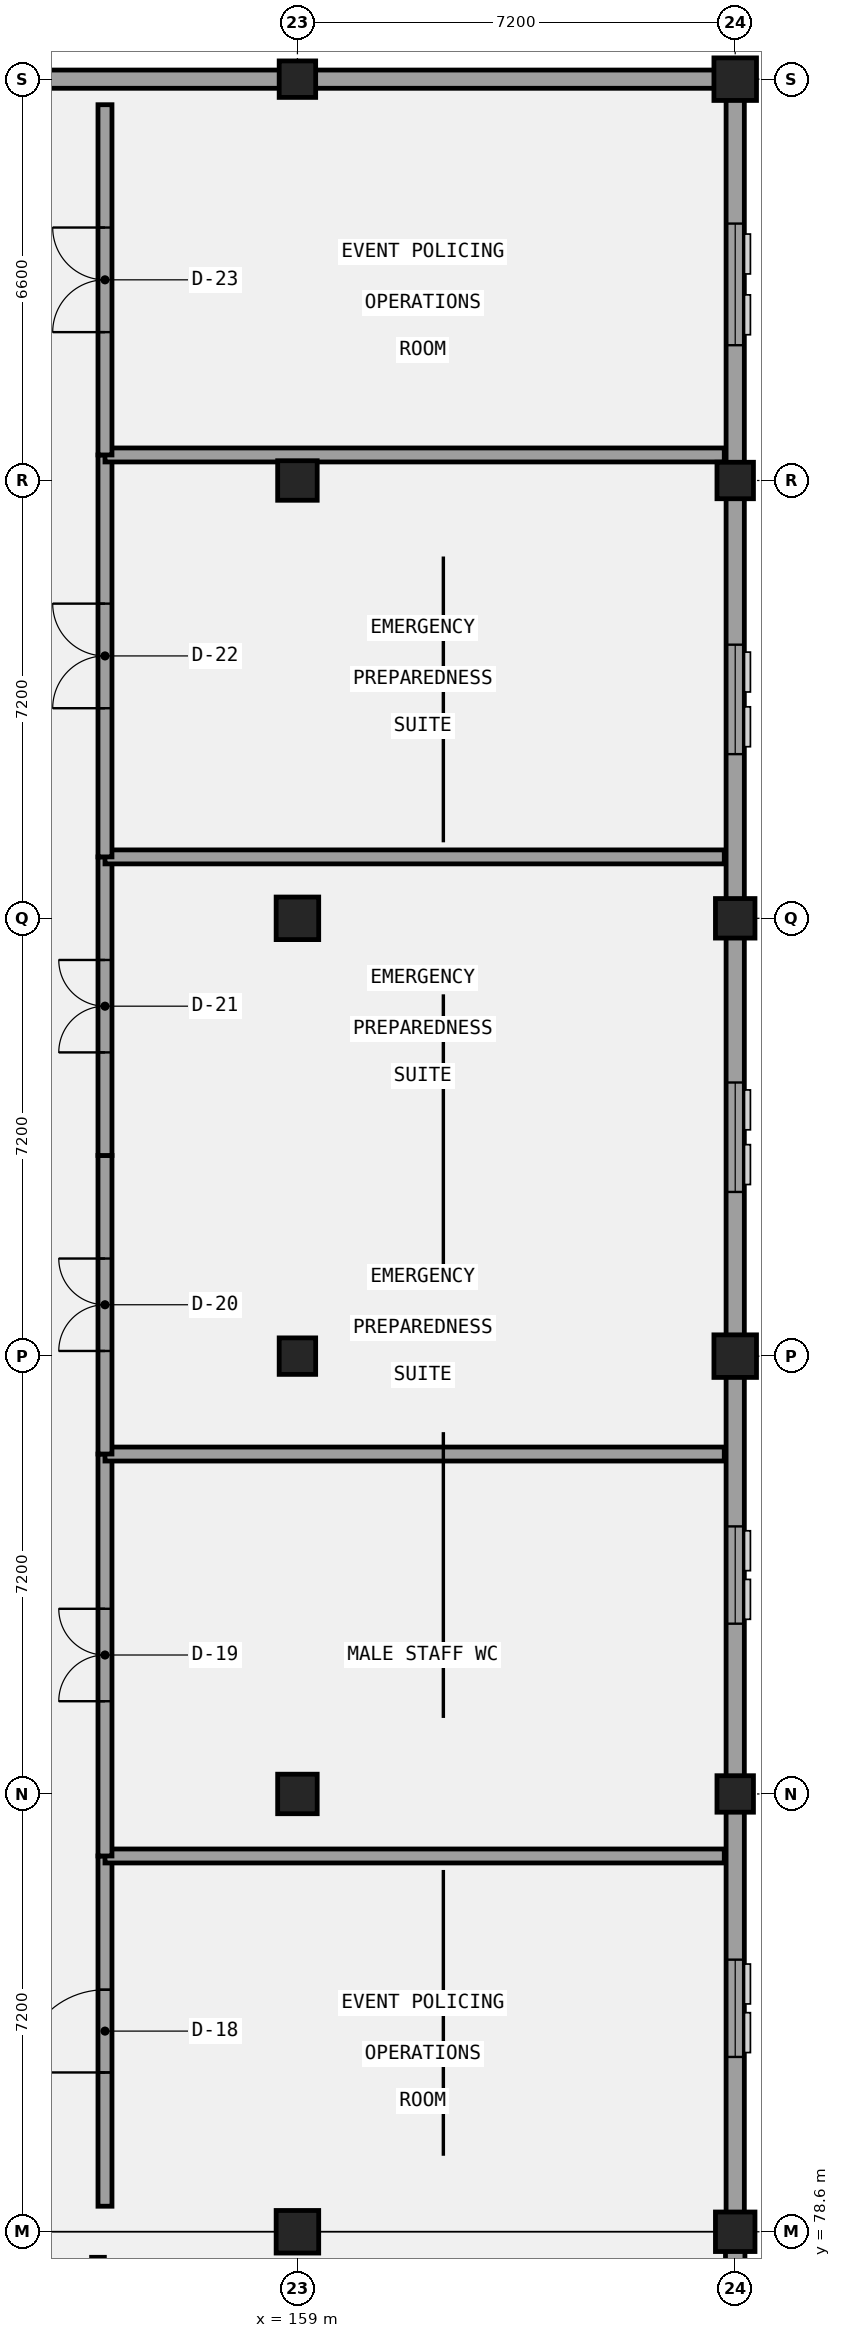
"""IFC4 building model, lengths in metres.
Left out: names, types, materials, properties, quantities, classifications, styles, units other than length and angle.
Written with IfcOpenShell. Run it as: python <this file> out.ifc"""

import sys

from ifc_helpers import new_model, si_unit, direction, frame, frame_2d, origin, origin_2d, place, context, subcontext, project, spatial, rectangle, extrude, element, fill, save


model = new_model("IFC4")
c1 = context("Model", 3, precision=1e-05, world=origin(), true_north=direction((0.0, 1.0)))
c2 = subcontext(c1, "Body", "Model", "MODEL_VIEW")
j1 = project(units=[si_unit("LENGTHUNIT", "METRE"), si_unit("PLANEANGLEUNIT", "RADIAN")], contexts=[c1])
p1 = place(None, origin())
s1 = spatial("IfcSite", under=j1, at=p1, CompositionType="ELEMENT")
p2 = place(p1, origin())
s2 = spatial("IfcBuilding", under=s1, at=p2, CompositionType="ELEMENT")
p3 = place(p2, frame((0.0, 0.0, 9.6)))
s3 = spatial("IfcBuildingStorey", under=s2, at=p3, CompositionType="ELEMENT", Elevation=9.6)
p4 = place(p3, frame((159.0, 78.6, 0.0), z_axis=(0.0, 0.0, 1.0), x_axis=(1.0, 0.0, 0.0)))
e1 = element("IfcColumn", 1, at=p4, inside=s3, PredefinedType="COLUMN", context=c2, shape_type="SweptSolid", body=[
    extrude(rectangle(XDim=0.7, YDim=0.7, at=origin_2d()), origin(), (0.0, 0.0, 1.0), 4.2),
])
p5 = place(p3, frame((159.0, 85.8, 0.0), z_axis=(0.0, 0.0, 1.0), x_axis=(1.0, 0.0, 0.0)))
e2 = element("IfcColumn", 2, at=p5, inside=s3, PredefinedType="COLUMN", context=c2, shape_type="SweptSolid", body=[
    extrude(rectangle(XDim=0.65, YDim=0.65, at=origin_2d()), origin(), (0.0, 0.0, 1.0), 4.2),
])
p6 = place(p3, frame((159.0, 93.0, 0.0), z_axis=(0.0, 0.0, 1.0), x_axis=(1.0, 0.0, 0.0)))
e3 = element("IfcColumn", 3, at=p6, inside=s3, PredefinedType="COLUMN", context=c2, shape_type="SweptSolid", body=[
    extrude(rectangle(XDim=0.6, YDim=0.6, at=origin_2d()), origin(), (0.0, 0.0, 1.0), 4.2),
])
p7 = place(p3, frame((159.0, 100.2, 0.0), z_axis=(0.0, 0.0, 1.0), x_axis=(1.0, 0.0, 0.0)))
e4 = element("IfcColumn", 4, at=p7, inside=s3, PredefinedType="COLUMN", context=c2, shape_type="SweptSolid", body=[
    extrude(rectangle(XDim=0.7, YDim=0.7, at=origin_2d()), origin(), (0.0, 0.0, 1.0), 4.2),
])
p8 = place(p3, frame((159.0, 107.4, 0.0), z_axis=(0.0, 0.0, 1.0), x_axis=(1.0, 0.0, 0.0)))
e5 = element("IfcColumn", 5, at=p8, inside=s3, PredefinedType="COLUMN", context=c2, shape_type="SweptSolid", body=[
    extrude(rectangle(XDim=0.65, YDim=0.65, at=origin_2d()), origin(), (0.0, 0.0, 1.0), 4.2),
])
p9 = place(p3, frame((159.0, 114.0, 0.0), z_axis=(0.0, 0.0, 1.0), x_axis=(1.0, 0.0, 0.0)))
e6 = element("IfcColumn", 6, at=p9, inside=s3, PredefinedType="COLUMN", context=c2, shape_type="SweptSolid", body=[
    extrude(rectangle(XDim=0.6, YDim=0.6, at=origin_2d()), origin(), (0.0, 0.0, 1.0), 4.2),
])
p10 = place(p3, frame((166.2, 78.6, 0.0), z_axis=(0.0, 0.0, 1.0), x_axis=(1.0, 0.0, 0.0)))
e7 = element("IfcColumn", 7, at=p10, inside=s3, PredefinedType="COLUMN", context=c2, shape_type="SweptSolid", body=[
    extrude(rectangle(XDim=0.65, YDim=0.65, at=origin_2d()), origin(), (0.0, 0.0, 1.0), 4.2),
])
p11 = place(p3, frame((166.2, 85.8, 0.0), z_axis=(0.0, 0.0, 1.0), x_axis=(1.0, 0.0, 0.0)))
e8 = element("IfcColumn", 8, at=p11, inside=s3, PredefinedType="COLUMN", context=c2, shape_type="SweptSolid", body=[
    extrude(rectangle(XDim=0.6, YDim=0.6, at=origin_2d()), origin(), (0.0, 0.0, 1.0), 4.2),
])
p12 = place(p3, frame((166.2, 93.0, 0.0), z_axis=(0.0, 0.0, 1.0), x_axis=(1.0, 0.0, 0.0)))
e9 = element("IfcColumn", 9, at=p12, inside=s3, PredefinedType="COLUMN", context=c2, shape_type="SweptSolid", body=[
    extrude(rectangle(XDim=0.7, YDim=0.7, at=origin_2d()), origin(), (0.0, 0.0, 1.0), 4.2),
])
p13 = place(p3, frame((166.2, 100.2, 0.0), z_axis=(0.0, 0.0, 1.0), x_axis=(1.0, 0.0, 0.0)))
e10 = element("IfcColumn", 10, at=p13, inside=s3, PredefinedType="COLUMN", context=c2, shape_type="SweptSolid", body=[
    extrude(rectangle(XDim=0.65, YDim=0.65, at=origin_2d()), origin(), (0.0, 0.0, 1.0), 4.2),
])
p14 = place(p3, frame((166.2, 107.4, 0.0), z_axis=(0.0, 0.0, 1.0), x_axis=(1.0, 0.0, 0.0)))
e11 = element("IfcColumn", 11, at=p14, inside=s3, PredefinedType="COLUMN", context=c2, shape_type="SweptSolid", body=[
    extrude(rectangle(XDim=0.6, YDim=0.6, at=origin_2d()), origin(), (0.0, 0.0, 1.0), 4.2),
])
p15 = place(p3, frame((166.2, 114.0, 0.0), z_axis=(0.0, 0.0, 1.0), x_axis=(1.0, 0.0, 0.0)))
e12 = element("IfcColumn", 12, at=p15, inside=s3, PredefinedType="COLUMN", context=c2, shape_type="SweptSolid", body=[
    extrude(rectangle(XDim=0.7, YDim=0.7, at=origin_2d()), origin(), (0.0, 0.0, 1.0), 4.2),
])
p16 = place(p3, frame((166.2, 49.99, 0.0), z_axis=(0.0, 0.0, 1.0), x_axis=(0.0, 1.0, 0.0)))
e13 = element("IfcWall", 13, at=p16, inside=s3, PredefinedType="SOLIDWALL", context=c2, shape_type="SweptSolid", body=[
    extrude(rectangle(XDim=28.45, YDim=0.32, at=frame_2d((14.225, 0.0))), origin(), (0.0, 0.0, 1.0), 3.19),
])
p17 = place(p16, frame((2.605, 0.0, 1.0)))
e14 = element("IfcOpeningElement", 14, at=p17, cuts=e13, PredefinedType="OPENING", context=c2, shape_type="SweptSolid", body=[
    extrude(rectangle(XDim=1.8, YDim=1.9, at=frame_2d((0.9, 0.95))), frame((0.0, 0.17, 0.0), z_axis=(0.0, -1.0, 0.0), x_axis=(1.0, 0.0, 0.0)), (0.0, 0.0, 1.0), 0.34),
])
p18 = place(p16, frame((9.71, 0.0, 1.0)))
e15 = element("IfcOpeningElement", 15, at=p18, cuts=e13, PredefinedType="OPENING", context=c2, shape_type="SweptSolid", body=[
    extrude(rectangle(XDim=1.8, YDim=1.9, at=frame_2d((0.9, 0.95))), frame((0.0, 0.17, 0.0), z_axis=(0.0, -1.0, 0.0), x_axis=(1.0, 0.0, 0.0)), (0.0, 0.0, 1.0), 0.34),
])
p19 = place(p16, frame((16.91, 0.0, 1.0)))
e16 = element("IfcOpeningElement", 16, at=p19, cuts=e13, PredefinedType="OPENING", context=c2, shape_type="SweptSolid", body=[
    extrude(rectangle(XDim=1.8, YDim=1.9, at=frame_2d((0.9, 0.95))), frame((0.0, 0.17, 0.0), z_axis=(0.0, -1.0, 0.0), x_axis=(1.0, 0.0, 0.0)), (0.0, 0.0, 1.0), 0.34),
])
p20 = place(p16, frame((24.03, 0.0, 1.0)))
e17 = element("IfcOpeningElement", 17, at=p20, cuts=e13, PredefinedType="OPENING", context=c2, shape_type="SweptSolid", body=[
    extrude(rectangle(XDim=1.8, YDim=1.9, at=frame_2d((0.9, 0.95))), frame((0.0, 0.17, 0.0), z_axis=(0.0, -1.0, 0.0), x_axis=(1.0, 0.0, 0.0)), (0.0, 0.0, 1.0), 0.34),
])
p21 = place(p3, frame((166.2, 78.75, 0.0), z_axis=(0.0, 0.0, 1.0), x_axis=(0.0, 1.0, 0.0)))
e18 = element("IfcWall", 18, at=p21, inside=s3, PredefinedType="SOLIDWALL", context=c2, shape_type="SweptSolid", body=[
    extrude(rectangle(XDim=35.1, YDim=0.3, at=frame_2d((17.55, 0.0))), origin(), (0.0, 0.0, 1.0), 2.94),
])
p22 = place(p21, frame((2.725, 0.0, 0.95)))
e19 = element("IfcOpeningElement", 19, at=p22, cuts=e18, PredefinedType="OPENING", context=c2, shape_type="SweptSolid", body=[
    extrude(rectangle(XDim=1.6, YDim=1.4, at=frame_2d((0.8, 0.7))), frame((0.0, 0.16, 0.0), z_axis=(0.0, -1.0, 0.0), x_axis=(1.0, 0.0, 0.0)), (0.0, 0.0, 1.0), 0.32),
])
p23 = place(p21, frame((9.85, 0.0, 0.95)))
e20 = element("IfcOpeningElement", 20, at=p23, cuts=e18, PredefinedType="OPENING", context=c2, shape_type="SweptSolid", body=[
    extrude(rectangle(XDim=1.6, YDim=1.65, at=frame_2d((0.8, 0.825))), frame((0.0, 0.16, 0.0), z_axis=(0.0, -1.0, 0.0), x_axis=(1.0, 0.0, 0.0)), (0.0, 0.0, 1.0), 0.32),
])
p24 = place(p21, frame((16.95, 0.0, 0.95)))
e21 = element("IfcOpeningElement", 21, at=p24, cuts=e18, PredefinedType="OPENING", context=c2, shape_type="SweptSolid", body=[
    extrude(rectangle(XDim=1.8, YDim=1.4, at=frame_2d((0.9, 0.7))), frame((0.0, 0.16, 0.0), z_axis=(0.0, -1.0, 0.0), x_axis=(1.0, 0.0, 0.0)), (0.0, 0.0, 1.0), 0.32),
])
p25 = place(p21, frame((24.15, 0.0, 0.95)))
e22 = element("IfcOpeningElement", 22, at=p25, cuts=e18, PredefinedType="OPENING", context=c2, shape_type="SweptSolid", body=[
    extrude(rectangle(XDim=1.8, YDim=1.65, at=frame_2d((0.9, 0.825))), frame((0.0, 0.16, 0.0), z_axis=(0.0, -1.0, 0.0), x_axis=(1.0, 0.0, 0.0)), (0.0, 0.0, 1.0), 0.32),
])
p26 = place(p21, frame((30.875, 0.0, 0.95)))
e23 = element("IfcOpeningElement", 23, at=p26, cuts=e18, PredefinedType="OPENING", context=c2, shape_type="SweptSolid", body=[
    extrude(rectangle(XDim=2.0, YDim=1.4, at=frame_2d((1.0, 0.7))), frame((0.0, 0.16, 0.0), z_axis=(0.0, -1.0, 0.0), x_axis=(1.0, 0.0, 0.0)), (0.0, 0.0, 1.0), 0.32),
])
p27 = place(p3, frame((166.35, 114.0, 0.0), z_axis=(0.0, 0.0, 1.0), x_axis=(-1.0, 0.0, 0.0)))
e24 = element("IfcWall", 24, at=p27, inside=s3, PredefinedType="SOLIDWALL", context=c2, shape_type="SweptSolid", body=[
    extrude(rectangle(XDim=21.9, YDim=0.3, at=frame_2d((10.95, 0.0))), origin(), (0.0, 0.0, 1.0), 3.19),
])
p28 = place(p27, frame((17.5, 0.0, 0.95)))
e25 = element("IfcOpeningElement", 25, at=p28, cuts=e24, PredefinedType="OPENING", context=c2, shape_type="SweptSolid", body=[
    extrude(rectangle(XDim=1.3, YDim=1.65, at=frame_2d((0.65, 0.825))), frame((0.0, 0.16, 0.0), z_axis=(0.0, -1.0, 0.0), x_axis=(1.0, 0.0, 0.0)), (0.0, 0.0, 1.0), 0.32),
])
p29 = place(p3, frame((155.835, 79.02, 0.0), z_axis=(0.0, 0.0, 1.0), x_axis=(0.0, 1.0, 0.0)))
e26 = element("IfcWall", 26, at=p29, inside=s3, PredefinedType="PARTITIONING", context=c2, shape_type="SweptSolid", body=[
    extrude(rectangle(XDim=5.76, YDim=0.23, at=frame_2d((2.88, 0.0))), origin(), (0.0, 0.0, 1.0), 3.94),
])
p30 = place(p29, frame((2.2, 0.0, 0.0)))
e27 = element("IfcOpeningElement", 27, at=p30, cuts=e26, PredefinedType="OPENING", context=c2, shape_type="SweptSolid", body=[
    extrude(rectangle(XDim=1.36, YDim=2.35, at=frame_2d((0.68, 1.175))), frame((0.0, 0.125, 0.0), z_axis=(0.0, -1.0, 0.0), x_axis=(1.0, 0.0, 0.0)), (0.0, 0.0, 1.0), 0.25),
])
p31 = place(p3, frame((155.835, 84.78, 0.0), z_axis=(0.0, 0.0, 1.0), x_axis=(1.0, 0.0, 0.0)))
e28 = element("IfcWall", 28, at=p31, inside=s3, PredefinedType="PARTITIONING", context=c2, shape_type="SweptSolid", body=[
    extrude(rectangle(XDim=10.185, YDim=0.23, at=frame_2d((5.093, 0.0))), origin(), (0.0, 0.0, 1.0), 3.94),
])
p32 = place(p3, frame((155.835, 84.78, 0.0), z_axis=(0.0, 0.0, 1.0), x_axis=(0.0, 1.0, 0.0)))
e29 = element("IfcWall", 29, at=p32, inside=s3, PredefinedType="PARTITIONING", context=c2, shape_type="SweptSolid", body=[
    extrude(rectangle(XDim=6.61, YDim=0.23, at=frame_2d((3.305, 0.0))), origin(), (0.0, 0.0, 1.0), 3.94),
])
p33 = place(p32, frame((2.545, 0.0, 0.0)))
e30 = element("IfcOpeningElement", 30, at=p33, cuts=e29, PredefinedType="OPENING", context=c2, shape_type="SweptSolid", body=[
    extrude(rectangle(XDim=1.52, YDim=2.1, at=frame_2d((0.76, 1.05))), frame((0.0, 0.125, 0.0), z_axis=(0.0, -1.0, 0.0), x_axis=(1.0, 0.0, 0.0)), (0.0, 0.0, 1.0), 0.25),
])
p34 = place(p3, frame((155.835, 91.39, 0.0), z_axis=(0.0, 0.0, 1.0), x_axis=(1.0, 0.0, 0.0)))
e31 = element("IfcWall", 31, at=p34, inside=s3, PredefinedType="PARTITIONING", context=c2, shape_type="SweptSolid", body=[
    extrude(rectangle(XDim=10.185, YDim=0.23, at=frame_2d((5.093, 0.0))), origin(), (0.0, 0.0, 1.0), 3.39),
])
p35 = place(p3, frame((155.835, 91.39, 0.0), z_axis=(0.0, 0.0, 1.0), x_axis=(0.0, 1.0, 0.0)))
e32 = element("IfcWall", 32, at=p35, inside=s3, PredefinedType="PARTITIONING", context=c2, shape_type="SweptSolid", body=[
    extrude(rectangle(XDim=4.91, YDim=0.23, at=frame_2d((2.455, 0.0))), origin(), (0.0, 0.0, 1.0), 3.94),
])
p36 = place(p35, frame((1.695, 0.0, 0.0)))
e33 = element("IfcOpeningElement", 33, at=p36, cuts=e32, PredefinedType="OPENING", context=c2, shape_type="SweptSolid", body=[
    extrude(rectangle(XDim=1.52, YDim=2.22, at=frame_2d((0.76, 1.11))), frame((0.0, 0.125, 0.0), z_axis=(0.0, -1.0, 0.0), x_axis=(1.0, 0.0, 0.0)), (0.0, 0.0, 1.0), 0.25),
])
p37 = place(p3, frame((155.835, 96.3, 0.0), z_axis=(0.0, 0.0, 1.0), x_axis=(0.0, 1.0, 0.0)))
e34 = element("IfcWall", 34, at=p37, inside=s3, PredefinedType="PARTITIONING", context=c2, shape_type="SweptSolid", body=[
    extrude(rectangle(XDim=4.91, YDim=0.23, at=frame_2d((2.455, 0.0))), origin(), (0.0, 0.0, 1.0), 3.94),
])
p38 = place(p37, frame((1.695, 0.0, 0.0)))
e35 = element("IfcOpeningElement", 35, at=p38, cuts=e34, PredefinedType="OPENING", context=c2, shape_type="SweptSolid", body=[
    extrude(rectangle(XDim=1.52, YDim=2.35, at=frame_2d((0.76, 1.175))), frame((0.0, 0.125, 0.0), z_axis=(0.0, -1.0, 0.0), x_axis=(1.0, 0.0, 0.0)), (0.0, 0.0, 1.0), 0.25),
])
p39 = place(p3, frame((155.835, 101.21, 0.0), z_axis=(0.0, 0.0, 1.0), x_axis=(1.0, 0.0, 0.0)))
e36 = element("IfcWall", 36, at=p39, inside=s3, PredefinedType="PARTITIONING", context=c2, shape_type="SweptSolid", body=[
    extrude(rectangle(XDim=10.185, YDim=0.23, at=frame_2d((5.093, 0.0))), origin(), (0.0, 0.0, 1.0), 3.94),
])
p40 = place(p3, frame((155.835, 101.21, 0.0), z_axis=(0.0, 0.0, 1.0), x_axis=(0.0, 1.0, 0.0)))
e37 = element("IfcWall", 37, at=p40, inside=s3, PredefinedType="PARTITIONING", context=c2, shape_type="SweptSolid", body=[
    extrude(rectangle(XDim=6.61, YDim=0.23, at=frame_2d((3.305, 0.0))), origin(), (0.0, 0.0, 1.0), 3.94),
])
p41 = place(p40, frame((2.445, 0.0, 0.0)))
e38 = element("IfcOpeningElement", 38, at=p41, cuts=e37, PredefinedType="OPENING", context=c2, shape_type="SweptSolid", body=[
    extrude(rectangle(XDim=1.72, YDim=2.1, at=frame_2d((0.86, 1.05))), frame((0.0, 0.125, 0.0), z_axis=(0.0, -1.0, 0.0), x_axis=(1.0, 0.0, 0.0)), (0.0, 0.0, 1.0), 0.25),
])
p42 = place(p3, frame((155.835, 107.82, 0.0), z_axis=(0.0, 0.0, 1.0), x_axis=(1.0, 0.0, 0.0)))
e39 = element("IfcWall", 39, at=p42, inside=s3, PredefinedType="PARTITIONING", context=c2, shape_type="SweptSolid", body=[
    extrude(rectangle(XDim=10.185, YDim=0.23, at=frame_2d((5.093, 0.0))), origin(), (0.0, 0.0, 1.0), 3.94),
])
p43 = place(p3, frame((155.835, 107.82, 0.0), z_axis=(0.0, 0.0, 1.0), x_axis=(0.0, 1.0, 0.0)))
e40 = element("IfcWall", 40, at=p43, inside=s3, PredefinedType="PARTITIONING", context=c2, shape_type="SweptSolid", body=[
    extrude(rectangle(XDim=5.76, YDim=0.23, at=frame_2d((2.88, 0.0))), origin(), (0.0, 0.0, 1.0), 3.94),
])
p44 = place(p43, frame((2.02, 0.0, 0.0)))
e41 = element("IfcOpeningElement", 41, at=p44, cuts=e40, PredefinedType="OPENING", context=c2, shape_type="SweptSolid", body=[
    extrude(rectangle(XDim=1.72, YDim=2.22, at=frame_2d((0.86, 1.11))), frame((0.0, 0.125, 0.0), z_axis=(0.0, -1.0, 0.0), x_axis=(1.0, 0.0, 0.0)), (0.0, 0.0, 1.0), 0.25),
])
p45 = place(p3, frame((155.72, 72.634, 0.0), z_axis=(0.0, 0.0, 1.0), x_axis=(0.0, 1.0, 0.0)))
e42 = element("IfcWall", 42, at=p45, inside=s3, PredefinedType="PARTITIONING", context=c2, shape_type="SweptSolid", body=[
    extrude(rectangle(XDim=5.546, YDim=0.21, at=frame_2d((2.773, 0.0))), origin(), (0.0, 0.0, 1.0), 3.94),
])
p46 = place(p45, frame((2.163, 0.0, 0.0)))
e43 = element("IfcOpeningElement", 43, at=p46, cuts=e42, PredefinedType="OPENING", context=c2, shape_type="SweptSolid", body=[
    extrude(rectangle(XDim=1.22, YDim=2.35, at=frame_2d((0.61, 1.175))), frame((0.0, 0.115, 0.0), z_axis=(0.0, -1.0, 0.0), x_axis=(1.0, 0.0, 0.0)), (0.0, 0.0, 1.0), 0.23),
])
p47 = place(p22, origin())
e44 = element("IfcWindow", 44, at=p47, inside=s3, PartitioningType="SINGLE_PANEL", PredefinedType="WINDOW", context=c2, shape_type="SweptSolid", body=[
    extrude(rectangle(XDim=1.6, YDim=1.4, at=frame_2d((0.8, 0.7))), frame((0.0, 0.03, 0.0), z_axis=(0.0, -1.0, 0.0), x_axis=(1.0, 0.0, 0.0)), (0.0, 0.0, 1.0), 0.06),
])
fill(e19, e44)
p48 = place(p23, origin())
e45 = element("IfcWindow", 45, at=p48, inside=s3, PartitioningType="SINGLE_PANEL", PredefinedType="WINDOW", context=c2, shape_type="SweptSolid", body=[
    extrude(rectangle(XDim=1.6, YDim=1.65, at=frame_2d((0.8, 0.825))), frame((0.0, 0.03, 0.0), z_axis=(0.0, -1.0, 0.0), x_axis=(1.0, 0.0, 0.0)), (0.0, 0.0, 1.0), 0.06),
])
fill(e20, e45)
p49 = place(p24, origin())
e46 = element("IfcWindow", 46, at=p49, inside=s3, PartitioningType="SINGLE_PANEL", PredefinedType="WINDOW", context=c2, shape_type="SweptSolid", body=[
    extrude(rectangle(XDim=1.8, YDim=1.4, at=frame_2d((0.9, 0.7))), frame((0.0, 0.03, 0.0), z_axis=(0.0, -1.0, 0.0), x_axis=(1.0, 0.0, 0.0)), (0.0, 0.0, 1.0), 0.06),
])
fill(e21, e46)
p50 = place(p25, origin())
e47 = element("IfcWindow", 47, at=p50, inside=s3, PartitioningType="SINGLE_PANEL", PredefinedType="WINDOW", context=c2, shape_type="SweptSolid", body=[
    extrude(rectangle(XDim=1.8, YDim=1.65, at=frame_2d((0.9, 0.825))), frame((0.0, 0.03, 0.0), z_axis=(0.0, -1.0, 0.0), x_axis=(1.0, 0.0, 0.0)), (0.0, 0.0, 1.0), 0.06),
])
fill(e22, e47)
p51 = place(p26, origin())
e48 = element("IfcWindow", 48, at=p51, inside=s3, PartitioningType="SINGLE_PANEL", PredefinedType="WINDOW", context=c2, shape_type="SweptSolid", body=[
    extrude(rectangle(XDim=2.0, YDim=1.4, at=frame_2d((1.0, 0.7))), frame((0.0, 0.03, 0.0), z_axis=(0.0, -1.0, 0.0), x_axis=(1.0, 0.0, 0.0)), (0.0, 0.0, 1.0), 0.06),
])
fill(e23, e48)
p52 = place(p30, origin())
e49 = element("IfcDoor", 49, at=p52, inside=s3, OperationType="SINGLE_SWING_LEFT", PredefinedType="DOOR", context=c2, shape_type="SweptSolid", body=[
    extrude(rectangle(XDim=1.36, YDim=2.35, at=frame_2d((0.68, 1.175))), frame((0.0, 0.025, 0.0), z_axis=(0.0, -1.0, 0.0), x_axis=(1.0, 0.0, 0.0)), (0.0, 0.0, 1.0), 0.05),
])
fill(e27, e49)
p53 = place(p33, origin())
e50 = element("IfcDoor", 50, at=p53, inside=s3, OperationType="DOUBLE_DOOR_SINGLE_SWING", PredefinedType="DOOR", context=c2, shape_type="SweptSolid", body=[
    extrude(rectangle(XDim=1.52, YDim=2.1, at=frame_2d((0.76, 1.05))), frame((0.0, 0.025, 0.0), z_axis=(0.0, -1.0, 0.0), x_axis=(1.0, 0.0, 0.0)), (0.0, 0.0, 1.0), 0.05),
])
fill(e30, e50)
p54 = place(p36, origin())
e51 = element("IfcDoor", 51, at=p54, inside=s3, OperationType="DOUBLE_DOOR_SINGLE_SWING", PredefinedType="DOOR", context=c2, shape_type="SweptSolid", body=[
    extrude(rectangle(XDim=1.52, YDim=2.22, at=frame_2d((0.76, 1.11))), frame((0.0, 0.025, 0.0), z_axis=(0.0, -1.0, 0.0), x_axis=(1.0, 0.0, 0.0)), (0.0, 0.0, 1.0), 0.05),
])
fill(e33, e51)
p55 = place(p38, origin())
e52 = element("IfcDoor", 52, at=p55, inside=s3, OperationType="DOUBLE_DOOR_SINGLE_SWING", PredefinedType="DOOR", context=c2, shape_type="SweptSolid", body=[
    extrude(rectangle(XDim=1.52, YDim=2.35, at=frame_2d((0.76, 1.175))), frame((0.0, 0.025, 0.0), z_axis=(0.0, -1.0, 0.0), x_axis=(1.0, 0.0, 0.0)), (0.0, 0.0, 1.0), 0.05),
])
fill(e35, e52)
p56 = place(p41, origin())
e53 = element("IfcDoor", 53, at=p56, inside=s3, OperationType="DOUBLE_DOOR_SINGLE_SWING", PredefinedType="DOOR", context=c2, shape_type="SweptSolid", body=[
    extrude(rectangle(XDim=1.72, YDim=2.1, at=frame_2d((0.86, 1.05))), frame((0.0, 0.025, 0.0), z_axis=(0.0, -1.0, 0.0), x_axis=(1.0, 0.0, 0.0)), (0.0, 0.0, 1.0), 0.05),
])
fill(e38, e53)
p57 = place(p44, origin())
e54 = element("IfcDoor", 54, at=p57, inside=s3, OperationType="DOUBLE_DOOR_SINGLE_SWING", PredefinedType="DOOR", context=c2, shape_type="SweptSolid", body=[
    extrude(rectangle(XDim=1.72, YDim=2.22, at=frame_2d((0.86, 1.11))), frame((0.0, 0.025, 0.0), z_axis=(0.0, -1.0, 0.0), x_axis=(1.0, 0.0, 0.0)), (0.0, 0.0, 1.0), 0.05),
])
fill(e41, e54)
save(model, sys.argv[1])
